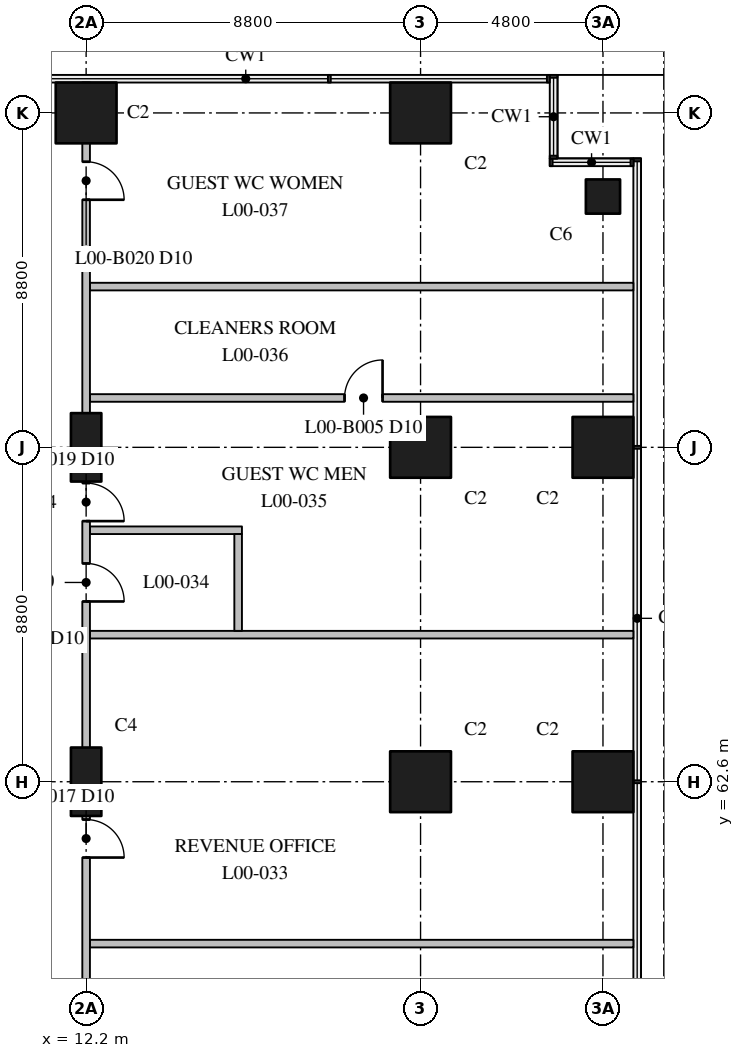
"""IFC4 building model, lengths in metres.
Left out: names, types, materials, properties, quantities, classifications, styles, units other than length and angle.
Written with IfcOpenShell. Run it as: python <this file> out.ifc"""

import sys

from ifc_helpers import new_model, si_unit, direction, frame, frame_2d, origin, origin_2d, place, context, subcontext, project, spatial, rectangle, extrude, element, fill, save


model = new_model("IFC4")
c1 = context("Model", 3, precision=1e-05, world=origin(), true_north=direction((0.0, 1.0)))
c2 = subcontext(c1, "Body", "Model", "MODEL_VIEW")
j1 = project(units=[si_unit("LENGTHUNIT", "METRE"), si_unit("PLANEANGLEUNIT", "RADIAN")], contexts=[c1])
p1 = place(None, origin())
s1 = spatial("IfcSite", under=j1, at=p1, CompositionType="ELEMENT")
p2 = place(p1, origin())
s2 = spatial("IfcBuilding", under=s1, at=p2, CompositionType="ELEMENT")
p3 = place(p2, origin())
s3 = spatial("IfcBuildingStorey", under=s2, at=p3, CompositionType="ELEMENT", Elevation=0.0)
for number, where, z_axis, x_axis in (
    (1, (12.2, 62.6, 0.0), (0.0, 0.0, 1.0), (0.0, 1.0, 0.0)),
    (2, (12.2, 71.4, 0.0), (0.0, 0.0, 1.0), (0.0, 1.0, 0.0)),
):
    element("IfcColumn", number, at=place(p3, frame(where, z_axis=z_axis, x_axis=x_axis)), inside=s3, PredefinedType="COLUMN", context=c2, shape_type="SweptSolid", body=[
        extrude(rectangle(XDim=1.8, YDim=0.8, at=origin_2d()), origin(), (0.0, 0.0, 1.0), 7.5),
    ])
for number, where, z_axis, x_axis in (
    (3, (12.2, 80.2, 0.0), (0.0, 0.0, 1.0), (1.0, 0.0, 0.0)),
    (4, (21.0, 62.6, 0.0), (0.0, 0.0, 1.0), (1.0, 0.0, 0.0)),
    (5, (21.0, 71.4, 0.0), (0.0, 0.0, 1.0), (1.0, 0.0, 0.0)),
    (6, (21.0, 80.2, 0.0), (0.0, 0.0, 1.0), (1.0, 0.0, 0.0)),
    (7, (25.8, 62.6, 0.0), (0.0, 0.0, 1.0), (1.0, 0.0, 0.0)),
    (8, (25.8, 71.4, 0.0), (0.0, 0.0, 1.0), (1.0, 0.0, 0.0)),
):
    element("IfcColumn", number, at=place(p3, frame(where, z_axis=z_axis, x_axis=x_axis)), inside=s3, PredefinedType="COLUMN", context=c2, shape_type="SweptSolid", body=[
        extrude(rectangle(XDim=1.6, YDim=1.6, at=origin_2d()), origin(), (0.0, 0.0, 1.0), 7.5),
    ])
p4 = place(p3, frame((25.8, 78.0, 0.0), z_axis=(0.0, 0.0, 1.0), x_axis=(1.0, 0.0, 0.0)))
e9 = element("IfcColumn", 9, at=p4, inside=s3, PredefinedType="COLUMN", context=c2, shape_type="SweptSolid", body=[
    extrude(rectangle(XDim=0.9, YDim=0.9, at=origin_2d()), origin(), (0.0, 0.0, 1.0), 7.5),
])
for number, where, z_axis, x_axis in (
    (10, (12.3, 58.34, 0.0), (0.0, 0.0, 1.0), (1.0, 0.0, 0.0)),
    (11, (12.3, 66.47, 0.0), (0.0, 0.0, 1.0), (1.0, 0.0, 0.0)),
):
    element("IfcWall", number, at=place(p3, frame(where, z_axis=z_axis, x_axis=x_axis)), inside=s3, PredefinedType="PARTITIONING", context=c2, shape_type="SweptSolid", body=[
        extrude(rectangle(XDim=14.3, YDim=0.2, at=frame_2d((7.15, 0.0))), origin(), (0.0, 0.0, 1.0), 7.1),
    ])
p5 = place(p3, frame((12.3, 69.218, 0.0), z_axis=(0.0, 0.0, 1.0), x_axis=(1.0, 0.0, 0.0)))
e12 = element("IfcWall", 12, at=p5, inside=s3, PredefinedType="PARTITIONING", context=c2, shape_type="SweptSolid", body=[
    extrude(rectangle(XDim=4.0, YDim=0.2, at=frame_2d((2.0, 0.0))), origin(), (0.0, 0.0, 1.0), 7.1),
])
p6 = place(p3, frame((12.3, 72.699, 0.0), z_axis=(0.0, 0.0, 1.0), x_axis=(1.0, 0.0, 0.0)))
e13 = element("IfcWall", 13, at=p6, inside=s3, PredefinedType="PARTITIONING", context=c2, shape_type="SweptSolid", body=[
    extrude(rectangle(XDim=14.3, YDim=0.2, at=frame_2d((7.15, 0.0))), origin(), (0.0, 0.0, 1.0), 7.1),
])
p7 = place(p6, frame((6.7, 0.0, 0.0)))
e14 = element("IfcOpeningElement", 14, at=p7, cuts=e13, PredefinedType="OPENING", context=c2, shape_type="SweptSolid", body=[
    extrude(rectangle(XDim=1.0, YDim=2.1, at=frame_2d((0.5, 1.05))), frame((0.0, 0.11, 0.0), z_axis=(0.0, -1.0, 0.0), x_axis=(1.0, 0.0, 0.0)), (0.0, 0.0, 1.0), 0.22),
])
p8 = place(p3, frame((12.3, 75.63, 0.0), z_axis=(0.0, 0.0, 1.0), x_axis=(1.0, 0.0, 0.0)))
e15 = element("IfcWall", 15, at=p8, inside=s3, PredefinedType="PARTITIONING", context=c2, shape_type="SweptSolid", body=[
    extrude(rectangle(XDim=14.3, YDim=0.2, at=frame_2d((7.15, 0.0))), origin(), (0.0, 0.0, 1.0), 7.1),
])
p9 = place(p3, frame((12.2, 31.9, 0.0), z_axis=(0.0, 0.0, 1.0), x_axis=(0.0, 1.0, 0.0)))
e16 = element("IfcWall", 16, at=p9, inside=s3, PredefinedType="PARTITIONING", context=c2, shape_type="SweptSolid", body=[
    extrude(rectangle(XDim=49.1, YDim=0.2, at=frame_2d((24.55, 0.0))), origin(), (0.0, 0.0, 1.0), 7.1),
])
p10 = place(p9, frame((2.375, 0.0, 0.0)))
e17 = element("IfcOpeningElement", 17, at=p10, cuts=e16, PredefinedType="OPENING", context=c2, shape_type="SweptSolid", body=[
    extrude(rectangle(XDim=1.0, YDim=2.1, at=frame_2d((0.5, 1.05))), frame((0.0, 0.11, 0.0), z_axis=(0.0, -1.0, 0.0), x_axis=(1.0, 0.0, 0.0)), (0.0, 0.0, 1.0), 0.22),
])
p11 = place(p9, frame((10.125, 0.0, 0.0)))
e18 = element("IfcOpeningElement", 18, at=p11, cuts=e16, PredefinedType="OPENING", context=c2, shape_type="SweptSolid", body=[
    extrude(rectangle(XDim=1.0, YDim=2.1, at=frame_2d((0.5, 1.05))), frame((0.0, 0.11, 0.0), z_axis=(0.0, -1.0, 0.0), x_axis=(1.0, 0.0, 0.0)), (0.0, 0.0, 1.0), 0.22),
])
p12 = place(p9, frame((19.92, 0.0, 0.0)))
e19 = element("IfcOpeningElement", 19, at=p12, cuts=e16, PredefinedType="OPENING", context=c2, shape_type="SweptSolid", body=[
    extrude(rectangle(XDim=1.0, YDim=2.1, at=frame_2d((0.5, 1.05))), frame((0.0, 0.11, 0.0), z_axis=(0.0, -1.0, 0.0), x_axis=(1.0, 0.0, 0.0)), (0.0, 0.0, 1.0), 0.22),
])
p13 = place(p9, frame((28.705, 0.0, 0.0)))
e20 = element("IfcOpeningElement", 20, at=p13, cuts=e16, PredefinedType="OPENING", context=c2, shape_type="SweptSolid", body=[
    extrude(rectangle(XDim=1.0, YDim=2.1, at=frame_2d((0.5, 1.05))), frame((0.0, 0.11, 0.0), z_axis=(0.0, -1.0, 0.0), x_axis=(1.0, 0.0, 0.0)), (0.0, 0.0, 1.0), 0.22),
])
p14 = place(p9, frame((35.444, 0.0, 0.0)))
e21 = element("IfcOpeningElement", 21, at=p14, cuts=e16, PredefinedType="OPENING", context=c2, shape_type="SweptSolid", body=[
    extrude(rectangle(XDim=1.0, YDim=2.1, at=frame_2d((0.5, 1.05))), frame((0.0, 0.11, 0.0), z_axis=(0.0, -1.0, 0.0), x_axis=(1.0, 0.0, 0.0)), (0.0, 0.0, 1.0), 0.22),
])
p15 = place(p9, frame((37.558, 0.0, 0.0)))
e22 = element("IfcOpeningElement", 22, at=p15, cuts=e16, PredefinedType="OPENING", context=c2, shape_type="SweptSolid", body=[
    extrude(rectangle(XDim=1.0, YDim=2.1, at=frame_2d((0.5, 1.05))), frame((0.0, 0.11, 0.0), z_axis=(0.0, -1.0, 0.0), x_axis=(1.0, 0.0, 0.0)), (0.0, 0.0, 1.0), 0.22),
])
p16 = place(p9, frame((46.015, 0.0, 0.0)))
e23 = element("IfcOpeningElement", 23, at=p16, cuts=e16, PredefinedType="OPENING", context=c2, shape_type="SweptSolid", body=[
    extrude(rectangle(XDim=1.0, YDim=2.1, at=frame_2d((0.5, 1.05))), frame((0.0, 0.11, 0.0), z_axis=(0.0, -1.0, 0.0), x_axis=(1.0, 0.0, 0.0)), (0.0, 0.0, 1.0), 0.22),
])
p17 = place(p3, frame((16.2, 66.57, 0.0), z_axis=(0.0, 0.0, 1.0), x_axis=(0.0, 1.0, 0.0)))
e24 = element("IfcWall", 24, at=p17, inside=s3, PredefinedType="PARTITIONING", context=c2, shape_type="SweptSolid", body=[
    extrude(rectangle(XDim=2.548, YDim=0.2, at=frame_2d((1.274, 0.0))), origin(), (0.0, 0.0, 1.0), 7.1),
])
p18 = place(p7, origin())
e25 = element("IfcDoor", 25, at=p18, inside=s3, OperationType="SINGLE_SWING_RIGHT", PredefinedType="DOOR", context=c2, shape_type="SweptSolid", body=[
    extrude(rectangle(XDim=1.0, YDim=2.1, at=frame_2d((0.5, 1.05))), frame((0.0, 0.025, 0.0), z_axis=(0.0, -1.0, 0.0), x_axis=(1.0, 0.0, 0.0)), (0.0, 0.0, 1.0), 0.05),
])
fill(e14, e25)
p19 = place(p13, frame((1.0, 0.0, 0.0), z_axis=(0.0, 0.0, 1.0), x_axis=(-1.0, 0.0, 0.0)))
e26 = element("IfcDoor", 26, at=p19, inside=s3, OperationType="SINGLE_SWING_LEFT", PredefinedType="DOOR", context=c2, shape_type="SweptSolid", body=[
    extrude(rectangle(XDim=1.0, YDim=2.1, at=frame_2d((0.5, 1.05))), frame((0.0, 0.025, 0.0), z_axis=(0.0, -1.0, 0.0), x_axis=(1.0, 0.0, 0.0)), (0.0, 0.0, 1.0), 0.05),
])
fill(e20, e26)
p20 = place(p14, frame((1.0, 0.0, 0.0), z_axis=(0.0, 0.0, 1.0), x_axis=(-1.0, 0.0, 0.0)))
e27 = element("IfcDoor", 27, at=p20, inside=s3, OperationType="SINGLE_SWING_LEFT", PredefinedType="DOOR", context=c2, shape_type="SweptSolid", body=[
    extrude(rectangle(XDim=1.0, YDim=2.1, at=frame_2d((0.5, 1.05))), frame((0.0, 0.025, 0.0), z_axis=(0.0, -1.0, 0.0), x_axis=(1.0, 0.0, 0.0)), (0.0, 0.0, 1.0), 0.05),
])
fill(e21, e27)
p21 = place(p15, frame((1.0, 0.0, 0.0), z_axis=(0.0, 0.0, 1.0), x_axis=(-1.0, 0.0, 0.0)))
e28 = element("IfcDoor", 28, at=p21, inside=s3, OperationType="SINGLE_SWING_LEFT", PredefinedType="DOOR", context=c2, shape_type="SweptSolid", body=[
    extrude(rectangle(XDim=1.0, YDim=2.1, at=frame_2d((0.5, 1.05))), frame((0.0, 0.025, 0.0), z_axis=(0.0, -1.0, 0.0), x_axis=(1.0, 0.0, 0.0)), (0.0, 0.0, 1.0), 0.05),
])
fill(e22, e28)
p22 = place(p16, frame((1.0, 0.0, 0.0), z_axis=(0.0, 0.0, 1.0), x_axis=(-1.0, 0.0, 0.0)))
e29 = element("IfcDoor", 29, at=p22, inside=s3, OperationType="SINGLE_SWING_LEFT", PredefinedType="DOOR", context=c2, shape_type="SweptSolid", body=[
    extrude(rectangle(XDim=1.0, YDim=2.1, at=frame_2d((0.5, 1.05))), frame((0.0, 0.025, 0.0), z_axis=(0.0, -1.0, 0.0), x_axis=(1.0, 0.0, 0.0)), (0.0, 0.0, 1.0), 0.05),
])
fill(e23, e29)
save(model, sys.argv[1])
